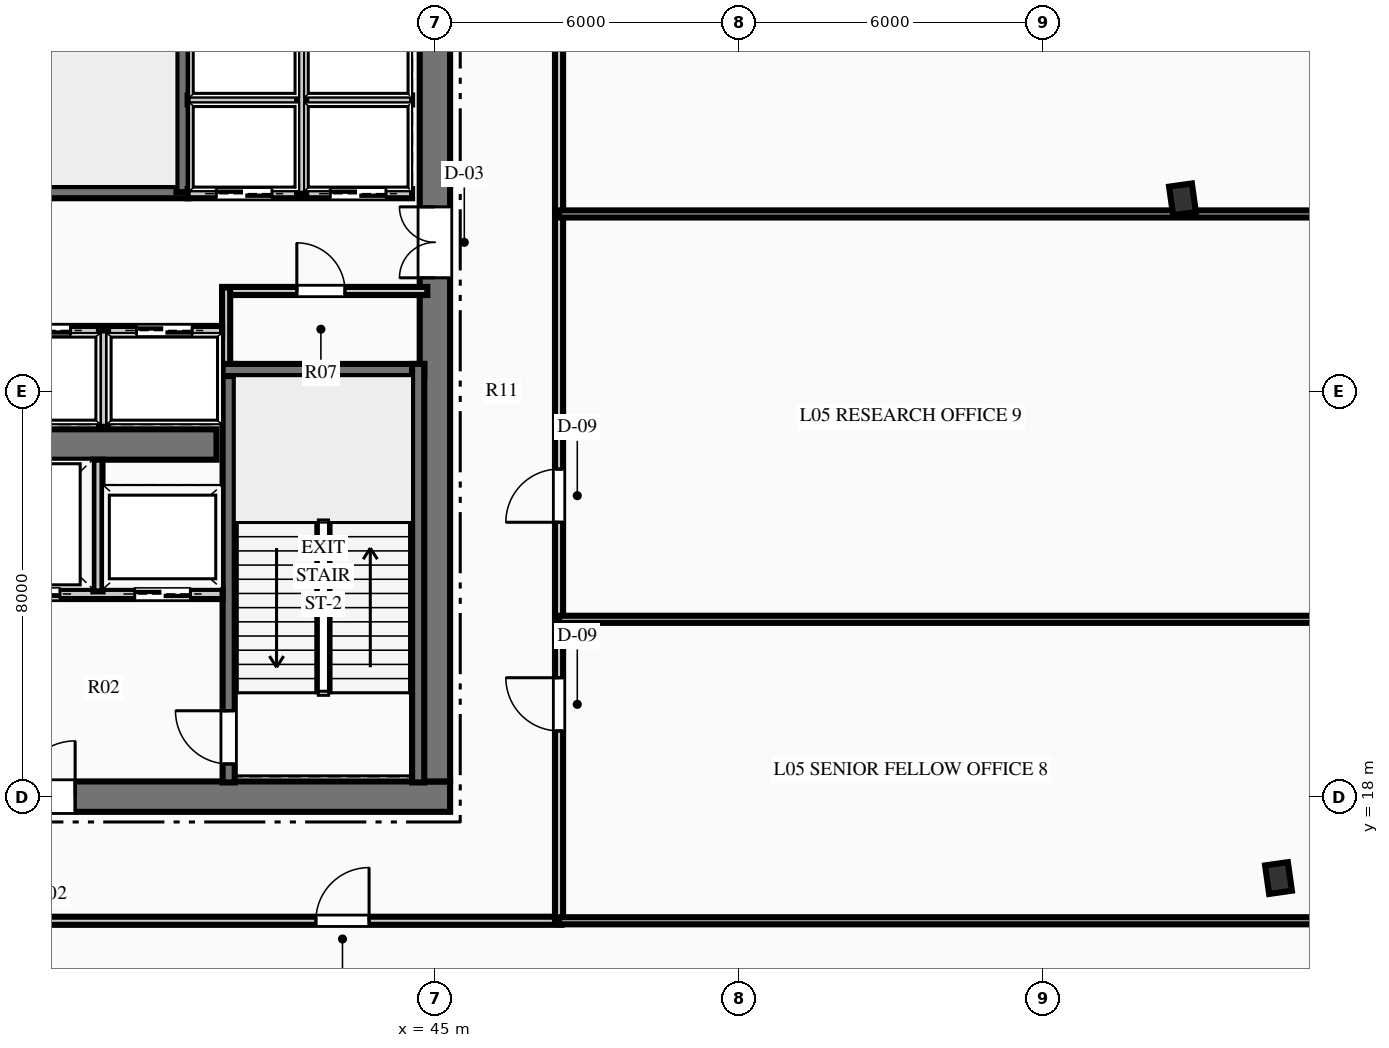
"""IFC4 building model, lengths in metres.
Left out: names, types, materials, properties, quantities, classifications, styles, units other than length and angle.
Written with IfcOpenShell. Run it as: python <this file> out.ifc"""

import sys

from ifc_helpers import new_model, si_unit, direction, frame, frame_2d, origin, origin_2d, place, context, subcontext, project, spatial, rectangle, i_section, extrude, element, fill, save


model = new_model("IFC4")
c1 = context("Model", 3, precision=1e-05, world=origin(), true_north=direction((0.0, 1.0)))
c2 = subcontext(c1, "Body", "Model", "MODEL_VIEW")
j1 = project(units=[si_unit("LENGTHUNIT", "METRE"), si_unit("PLANEANGLEUNIT", "RADIAN")], contexts=[c1])
p1 = place(None, origin())
s1 = spatial("IfcSite", under=j1, at=p1, CompositionType="ELEMENT")
p2 = place(p1, origin())
s2 = spatial("IfcBuilding", under=s1, at=p2, CompositionType="ELEMENT")
p3 = place(p2, frame((0.0, 0.0, 28.2)))
s3 = spatial("IfcBuildingStorey", under=s2, at=p3, CompositionType="ELEMENT", Elevation=28.2)
p4 = place(p3, frame((26.7, 18.0, 0.0), z_axis=(0.0, 0.0, 1.0), x_axis=(1.0, 0.0, 0.0)))
e1 = element("IfcWall", 1, at=p4, inside=s3, PredefinedType="SHEAR", context=c2, shape_type="SweptSolid", body=[
    extrude(rectangle(XDim=18.6, YDim=0.6, at=frame_2d((9.3, 0.0))), origin(), (0.0, 0.0, 1.0), 4.5),
])
p5 = place(p4, frame((7.4, 0.0, 0.0)))
e2 = element("IfcOpeningElement", 2, at=p5, cuts=e1, PredefinedType="OPENING", context=c2, shape_type="SweptSolid", body=[
    extrude(rectangle(XDim=1.1, YDim=2.15, at=frame_2d((0.55, 1.075))), frame((0.0, 0.31, 0.0), z_axis=(0.0, -1.0, 0.0), x_axis=(1.0, 0.0, 0.0)), (0.0, 0.0, 1.0), 0.62),
])
p6 = place(p4, frame((10.1, 0.0, 0.0)))
e3 = element("IfcOpeningElement", 3, at=p6, cuts=e1, PredefinedType="OPENING", context=c2, shape_type="SweptSolid", body=[
    extrude(rectangle(XDim=1.1, YDim=2.15, at=frame_2d((0.55, 1.075))), frame((0.0, 0.31, 0.0), z_axis=(0.0, -1.0, 0.0), x_axis=(1.0, 0.0, 0.0)), (0.0, 0.0, 1.0), 0.62),
])
p7 = place(p3, frame((45.0, 18.3, 0.0), z_axis=(0.0, 0.0, 1.0), x_axis=(0.0, 1.0, 0.0)))
e4 = element("IfcWall", 4, at=p7, inside=s3, PredefinedType="SHEAR", context=c2, shape_type="SweptSolid", body=[
    extrude(rectangle(XDim=15.4, YDim=0.6, at=frame_2d((7.7, 0.0))), origin(), (0.0, 0.0, 1.0), 4.5),
])
p8 = place(p7, frame((9.94, 0.0, 0.0)))
e5 = element("IfcOpeningElement", 5, at=p8, cuts=e4, PredefinedType="OPENING", context=c2, shape_type="SweptSolid", body=[
    extrude(rectangle(XDim=1.4, YDim=2.2, at=frame_2d((0.7, 1.1))), frame((0.0, 0.31, 0.0), z_axis=(0.0, -1.0, 0.0), x_axis=(1.0, 0.0, 0.0)), (0.0, 0.0, 1.0), 0.62),
])
p9 = place(p3, frame((31.31, 24.95, 0.0), z_axis=(0.0, 0.0, 1.0), x_axis=(1.0, 0.0, 0.0)))
e6 = element("IfcWall", 6, at=p9, inside=s3, PredefinedType="SHEAR", context=c2, shape_type="SweptSolid", body=[
    extrude(rectangle(XDim=9.38, YDim=0.6, at=frame_2d((4.69, 0.0))), origin(), (0.0, 0.0, 1.0), 4.5),
])
p10 = place(p3, frame((40.93, 18.28, 0.0), z_axis=(0.0, 0.0, 1.0), x_axis=(0.0, 1.0, 0.0)))
e7 = element("IfcWall", 7, at=p10, inside=s3, PredefinedType="SHEAR", context=c2, shape_type="SweptSolid", body=[
    extrude(rectangle(XDim=8.26, YDim=0.24, at=frame_2d((4.13, 0.0))), origin(), (0.0, 0.0, 1.0), 4.5),
])
p11 = place(p10, frame((0.365, 0.0, 0.0)))
e8 = element("IfcOpeningElement", 8, at=p11, cuts=e7, PredefinedType="OPENING", context=c2, shape_type="SweptSolid", body=[
    extrude(rectangle(XDim=1.05, YDim=2.15, at=frame_2d((0.525, 1.075))), frame((0.0, 0.13, 0.0), z_axis=(0.0, -1.0, 0.0), x_axis=(1.0, 0.0, 0.0)), (0.0, 0.0, 1.0), 0.26),
])
p12 = place(p3, frame((40.81, 26.42, 0.0), z_axis=(0.0, 0.0, 1.0), x_axis=(1.0, 0.0, 0.0)))
e9 = element("IfcWall", 9, at=p12, inside=s3, PredefinedType="SHEAR", context=c2, shape_type="SweptSolid", body=[
    extrude(rectangle(XDim=3.98, YDim=0.24, at=frame_2d((1.99, 0.0))), origin(), (0.0, 0.0, 1.0), 4.5),
])
p13 = place(p3, frame((44.67, 18.28, 0.0), z_axis=(0.0, 0.0, 1.0), x_axis=(0.0, 1.0, 0.0)))
e10 = element("IfcWall", 10, at=p13, inside=s3, PredefinedType="SHEAR", context=c2, shape_type="SweptSolid", body=[
    extrude(rectangle(XDim=8.26, YDim=0.24, at=frame_2d((4.13, 0.0))), origin(), (0.0, 0.0, 1.0), 4.5),
])
p14 = place(p3, frame((31.76, 29.93, 0.0), z_axis=(0.0, 0.0, 1.0), x_axis=(1.0, 0.0, 0.0)))
e11 = element("IfcWall", 11, at=p14, inside=s3, PredefinedType="SHEAR", context=c2, shape_type="SweptSolid", body=[
    extrude(rectangle(XDim=8.38, YDim=0.24, at=frame_2d((4.19, 0.0))), origin(), (0.0, 0.0, 1.0), 4.5),
])
p15 = place(p14, frame((0.565, 0.0, 0.0)))
e12 = element("IfcOpeningElement", 12, at=p15, cuts=e11, PredefinedType="OPENING", context=c2, shape_type="SweptSolid", body=[
    extrude(rectangle(XDim=1.05, YDim=2.15, at=frame_2d((0.525, 1.075))), frame((0.0, 0.13, 0.0), z_axis=(0.0, -1.0, 0.0), x_axis=(1.0, 0.0, 0.0)), (0.0, 0.0, 1.0), 0.26),
])
p16 = place(p3, frame((40.02, 29.93, 0.0), z_axis=(0.0, 0.0, 1.0), x_axis=(0.0, 1.0, 0.0)))
e13 = element("IfcWall", 13, at=p16, inside=s3, PredefinedType="SHEAR", context=c2, shape_type="SweptSolid", body=[
    extrude(rectangle(XDim=3.85, YDim=0.24, at=frame_2d((1.925, 0.0))), origin(), (0.0, 0.0, 1.0), 4.5),
])
for number, where, z_axis, x_axis in (
    (14, (61.648, 16.393, 0.0), (0.0, 0.0, 1.0), (0.99, 0.14, 0.0)),
    (15, (59.753, 29.789, 0.0), (0.0, 0.0, 1.0), (0.99, 0.14, 0.0)),
):
    element("IfcColumn", number, at=place(p3, frame(where, z_axis=z_axis, x_axis=x_axis)), inside=s3, PredefinedType="COLUMN", context=c2, shape_type="SweptSolid", body=[
        extrude(i_section(OverallWidth=0.454, OverallDepth=0.569, WebThickness=0.078, FlangeThickness=0.125, at=origin_2d()), origin(), (0.0, 0.0, 1.0), 4.5),
    ])
p17 = place(p3, frame((36.12, 22.0, 0.0), z_axis=(0.0, 0.0, 1.0), x_axis=(1.0, 0.0, 0.0)))
e16 = element("IfcWall", 16, at=p17, inside=s3, PredefinedType="PARTITIONING", context=c2, shape_type="SweptSolid", body=[
    extrude(rectangle(XDim=4.69, YDim=0.2, at=frame_2d((2.345, 0.0))), origin(), (0.0, 0.0, 1.0), 4.19),
])
p18 = place(p17, frame((2.955, 0.0, 0.0)))
e17 = element("IfcOpeningElement", 17, at=p18, cuts=e16, PredefinedType="OPENING", context=c2, shape_type="SweptSolid", body=[
    extrude(rectangle(XDim=1.1, YDim=2.15, at=frame_2d((0.55, 1.075))), frame((0.0, 0.11, 0.0), z_axis=(0.0, -1.0, 0.0), x_axis=(1.0, 0.0, 0.0)), (0.0, 0.0, 1.0), 0.22),
])
p19 = place(p17, frame((0.08, 0.0, 0.0)))
e18 = element("IfcOpeningElement", 18, at=p19, cuts=e16, PredefinedType="OPENING", context=c2, shape_type="SweptSolid", body=[
    extrude(rectangle(XDim=1.4, YDim=2.2, at=frame_2d((0.7, 1.1))), frame((0.0, 0.11, 0.0), z_axis=(0.0, -1.0, 0.0), x_axis=(1.0, 0.0, 0.0)), (0.0, 0.0, 1.0), 0.22),
])
p20 = place(p3, frame((38.35, 22.05, 0.0), z_axis=(0.0, 0.0, 1.0), x_axis=(0.0, 1.0, 0.0)))
e19 = element("IfcWall", 19, at=p20, inside=s3, PredefinedType="PARTITIONING", context=c2, shape_type="SweptSolid", body=[
    extrude(rectangle(XDim=2.6, YDim=0.18, at=frame_2d((1.3, 0.0))), origin(), (0.0, 0.0, 1.0), 4.19),
])
p21 = place(p3, frame((40.8, 27.98, 0.0), z_axis=(0.0, 0.0, 1.0), x_axis=(1.0, 0.0, 0.0)))
e20 = element("IfcWall", 20, at=p21, inside=s3, PredefinedType="PARTITIONING", context=c2, shape_type="SweptSolid", body=[
    extrude(rectangle(XDim=4.05, YDim=0.16, at=frame_2d((2.025, 0.0))), origin(), (0.0, 0.0, 1.0), 4.19),
])
p22 = place(p21, frame((1.475, 0.0, 0.0)))
e21 = element("IfcOpeningElement", 21, at=p22, cuts=e20, PredefinedType="OPENING", context=c2, shape_type="SweptSolid", body=[
    extrude(rectangle(XDim=0.95, YDim=2.15, at=frame_2d((0.475, 1.075))), frame((0.0, 0.09, 0.0), z_axis=(0.0, -1.0, 0.0), x_axis=(1.0, 0.0, 0.0)), (0.0, 0.0, 1.0), 0.18),
])
p23 = place(p3, frame((40.88, 26.54, 0.0), z_axis=(0.0, 0.0, 1.0), x_axis=(0.0, 1.0, 0.0)))
e22 = element("IfcWall", 22, at=p23, inside=s3, PredefinedType="PARTITIONING", context=c2, shape_type="SweptSolid", body=[
    extrude(rectangle(XDim=1.51, YDim=0.16, at=frame_2d((0.755, 0.0))), origin(), (0.0, 0.0, 1.0), 4.19),
])
p24 = place(p3, frame((40.12, 29.9, 0.0), z_axis=(0.0, 0.0, 1.0), x_axis=(1.0, 0.0, 0.0)))
e23 = element("IfcWall", 23, at=p24, inside=s3, PredefinedType="PARTITIONING", context=c2, shape_type="SweptSolid", body=[
    extrude(rectangle(XDim=4.43, YDim=0.18, at=frame_2d((2.215, 0.0))), origin(), (0.0, 0.0, 1.0), 4.19),
])
p25 = place(p24, frame((0.565, 0.0, 0.0)))
e24 = element("IfcOpeningElement", 24, at=p25, cuts=e23, PredefinedType="OPENING", context=c2, shape_type="SweptSolid", body=[
    extrude(rectangle(XDim=1.1, YDim=2.15, at=frame_2d((0.55, 1.075))), frame((0.0, 0.1, 0.0), z_axis=(0.0, -1.0, 0.0), x_axis=(1.0, 0.0, 0.0)), (0.0, 0.0, 1.0), 0.2),
])
p26 = place(p24, frame((2.815, 0.0, 0.0)))
e25 = element("IfcOpeningElement", 25, at=p26, cuts=e23, PredefinedType="OPENING", context=c2, shape_type="SweptSolid", body=[
    extrude(rectangle(XDim=1.1, YDim=2.15, at=frame_2d((0.55, 1.075))), frame((0.0, 0.1, 0.0), z_axis=(0.0, -1.0, 0.0), x_axis=(1.0, 0.0, 0.0)), (0.0, 0.0, 1.0), 0.2),
])
p27 = place(p3, frame((40.12, 31.75, 0.0), z_axis=(0.0, 0.0, 1.0), x_axis=(1.0, 0.0, 0.0)))
e26 = element("IfcWall", 26, at=p27, inside=s3, PredefinedType="PARTITIONING", context=c2, shape_type="SweptSolid", body=[
    extrude(rectangle(XDim=4.43, YDim=0.18, at=frame_2d((2.215, 0.0))), origin(), (0.0, 0.0, 1.0), 4.19),
])
p28 = place(p3, frame((42.37, 29.9, 0.0), z_axis=(0.0, 0.0, 1.0), x_axis=(0.0, 1.0, 0.0)))
e27 = element("IfcWall", 27, at=p28, inside=s3, PredefinedType="PARTITIONING", context=c2, shape_type="SweptSolid", body=[
    extrude(rectangle(XDim=3.75, YDim=0.18, at=frame_2d((1.875, 0.0))), origin(), (0.0, 0.0, 1.0), 4.19),
])
p29 = place(p3, frame((31.2, 27.2, 0.0), z_axis=(0.0, 0.0, 1.0), x_axis=(1.0, 0.0, 0.0)))
e28 = element("IfcWall", 28, at=p29, inside=s3, PredefinedType="PARTITIONING", context=c2, shape_type="SweptSolid", body=[
    extrude(rectangle(XDim=9.6, YDim=0.18, at=frame_2d((4.8, 0.0))), origin(), (0.0, 0.0, 1.0), 4.19),
])
p30 = place(p29, frame((0.59, 0.0, 0.0)))
e29 = element("IfcOpeningElement", 29, at=p30, cuts=e28, PredefinedType="OPENING", context=c2, shape_type="SweptSolid", body=[
    extrude(rectangle(XDim=1.1, YDim=2.15, at=frame_2d((0.55, 1.075))), frame((0.0, 0.1, 0.0), z_axis=(0.0, -1.0, 0.0), x_axis=(1.0, 0.0, 0.0)), (0.0, 0.0, 1.0), 0.2),
])
p31 = place(p29, frame((2.99, 0.0, 0.0)))
e30 = element("IfcOpeningElement", 30, at=p31, cuts=e28, PredefinedType="OPENING", context=c2, shape_type="SweptSolid", body=[
    extrude(rectangle(XDim=1.1, YDim=2.15, at=frame_2d((0.55, 1.075))), frame((0.0, 0.1, 0.0), z_axis=(0.0, -1.0, 0.0), x_axis=(1.0, 0.0, 0.0)), (0.0, 0.0, 1.0), 0.2),
])
p32 = place(p29, frame((5.51, 0.0, 0.0)))
e31 = element("IfcOpeningElement", 31, at=p32, cuts=e28, PredefinedType="OPENING", context=c2, shape_type="SweptSolid", body=[
    extrude(rectangle(XDim=1.1, YDim=2.15, at=frame_2d((0.55, 1.075))), frame((0.0, 0.1, 0.0), z_axis=(0.0, -1.0, 0.0), x_axis=(1.0, 0.0, 0.0)), (0.0, 0.0, 1.0), 0.2),
])
p33 = place(p29, frame((7.91, 0.0, 0.0)))
e32 = element("IfcOpeningElement", 32, at=p33, cuts=e28, PredefinedType="OPENING", context=c2, shape_type="SweptSolid", body=[
    extrude(rectangle(XDim=1.1, YDim=2.15, at=frame_2d((0.55, 1.075))), frame((0.0, 0.1, 0.0), z_axis=(0.0, -1.0, 0.0), x_axis=(1.0, 0.0, 0.0)), (0.0, 0.0, 1.0), 0.2),
])
p34 = place(p3, frame((38.46, 25.3, 0.0), z_axis=(0.0, 0.0, 1.0), x_axis=(0.0, 1.0, 0.0)))
e33 = element("IfcWall", 33, at=p34, inside=s3, PredefinedType="PARTITIONING", context=c2, shape_type="SweptSolid", body=[
    extrude(rectangle(XDim=1.9, YDim=0.18, at=frame_2d((0.95, 0.0))), origin(), (0.0, 0.0, 1.0), 4.19),
])
p35 = place(p3, frame((24.5, 15.55, 0.0), z_axis=(0.0, 0.0, 1.0), x_axis=(1.0, 0.0, 0.0)))
e34 = element("IfcWall", 34, at=p35, inside=s3, PredefinedType="PARTITIONING", context=c2, shape_type="SweptSolid", body=[
    extrude(rectangle(XDim=23.0, YDim=0.16, at=frame_2d((11.5, 0.0))), origin(), (0.0, 0.0, 1.0), 4.19),
])
p36 = place(p35, frame((3.525, 0.0, 0.0)))
e35 = element("IfcOpeningElement", 35, at=p36, cuts=e34, PredefinedType="OPENING", context=c2, shape_type="SweptSolid", body=[
    extrude(rectangle(XDim=0.95, YDim=2.15, at=frame_2d((0.475, 1.075))), frame((0.0, 0.09, 0.0), z_axis=(0.0, -1.0, 0.0), x_axis=(1.0, 0.0, 0.0)), (0.0, 0.0, 1.0), 0.18),
])
p37 = place(p35, frame((18.151, 0.0, 0.0)))
e36 = element("IfcOpeningElement", 36, at=p37, cuts=e34, PredefinedType="OPENING", context=c2, shape_type="SweptSolid", body=[
    extrude(rectangle(XDim=1.05, YDim=2.15, at=frame_2d((0.525, 1.075))), frame((0.0, 0.09, 0.0), z_axis=(0.0, -1.0, 0.0), x_axis=(1.0, 0.0, 0.0)), (0.0, 0.0, 1.0), 0.18),
])
p38 = place(p3, frame((47.45, 15.55, 0.0), z_axis=(0.0, 0.0, 1.0), x_axis=(0.0, 1.0, 0.0)))
e37 = element("IfcWall", 37, at=p38, inside=s3, PredefinedType="PARTITIONING", context=c2, shape_type="SweptSolid", body=[
    extrude(rectangle(XDim=20.9, YDim=0.16, at=frame_2d((10.45, 0.0))), origin(), (0.0, 0.0, 1.0), 4.19),
])
p39 = place(p38, frame((3.747, 0.0, 0.0)))
e38 = element("IfcOpeningElement", 38, at=p39, cuts=e37, PredefinedType="OPENING", context=c2, shape_type="SweptSolid", body=[
    extrude(rectangle(XDim=1.05, YDim=2.15, at=frame_2d((0.525, 1.075))), frame((0.0, 0.09, 0.0), z_axis=(0.0, -1.0, 0.0), x_axis=(1.0, 0.0, 0.0)), (0.0, 0.0, 1.0), 0.18),
])
p40 = place(p38, frame((7.865, 0.0, 0.0)))
e39 = element("IfcOpeningElement", 39, at=p40, cuts=e37, PredefinedType="OPENING", context=c2, shape_type="SweptSolid", body=[
    extrude(rectangle(XDim=1.05, YDim=2.15, at=frame_2d((0.525, 1.075))), frame((0.0, 0.09, 0.0), z_axis=(0.0, -1.0, 0.0), x_axis=(1.0, 0.0, 0.0)), (0.0, 0.0, 1.0), 0.18),
])
p41 = place(p38, frame((18.045, 0.0, 0.0)))
e40 = element("IfcOpeningElement", 40, at=p41, cuts=e37, PredefinedType="OPENING", context=c2, shape_type="SweptSolid", body=[
    extrude(rectangle(XDim=1.05, YDim=2.15, at=frame_2d((0.525, 1.075))), frame((0.0, 0.09, 0.0), z_axis=(0.0, -1.0, 0.0), x_axis=(1.0, 0.0, 0.0)), (0.0, 0.0, 1.0), 0.18),
])
for number, where, z_axis, x_axis in (
    (41, (47.45, 15.55, 0.0), (0.0, 0.0, 1.0), (1.0, 0.0, 0.0)),
    (42, (47.45, 21.5, 0.0), (0.0, 0.0, 1.0), (1.0, 0.0, 0.0)),
):
    element("IfcWall", number, at=place(p3, frame(where, z_axis=z_axis, x_axis=x_axis)), inside=s3, PredefinedType="PARTITIONING", context=c2, shape_type="SweptSolid", body=[
        extrude(rectangle(XDim=15.51, YDim=0.14, at=frame_2d((7.755, 0.0))), origin(), (0.0, 0.0, 1.0), 4.19),
    ])
p42 = place(p3, frame((47.45, 29.5, 0.0), z_axis=(0.0, 0.0, 1.0), x_axis=(1.0, 0.0, 0.0)))
e43 = element("IfcWall", 43, at=p42, inside=s3, PredefinedType="PARTITIONING", context=c2, shape_type="SweptSolid", body=[
    extrude(rectangle(XDim=15.51, YDim=0.14, at=frame_2d((7.755, 0.0))), origin(), (0.0, 0.0, 1.0), 3.489),
])
p43 = place(p22, origin())
e44 = element("IfcDoor", 44, at=p43, inside=s3, OperationType="SINGLE_SWING_LEFT", PredefinedType="DOOR", context=c2, shape_type="SweptSolid", body=[
    extrude(rectangle(XDim=0.95, YDim=2.15, at=frame_2d((0.475, 1.075))), frame((0.0, 0.025, 0.0), z_axis=(0.0, -1.0, 0.0), x_axis=(1.0, 0.0, 0.0)), (0.0, 0.0, 1.0), 0.05),
])
fill(e21, e44)
p44 = place(p11, origin())
e45 = element("IfcDoor", 45, at=p44, inside=s3, OperationType="SINGLE_SWING_RIGHT", PredefinedType="DOOR", context=c2, shape_type="SweptSolid", body=[
    extrude(rectangle(XDim=1.05, YDim=2.15, at=frame_2d((0.525, 1.075))), frame((0.0, 0.025, 0.0), z_axis=(0.0, -1.0, 0.0), x_axis=(1.0, 0.0, 0.0)), (0.0, 0.0, 1.0), 0.05),
])
fill(e8, e45)
p45 = place(p6, origin())
e46 = element("IfcDoor", 46, at=p45, inside=s3, OperationType="SINGLE_SWING_RIGHT", PredefinedType="DOOR", context=c2, shape_type="SweptSolid", body=[
    extrude(rectangle(XDim=1.1, YDim=2.15, at=frame_2d((0.55, 1.075))), frame((0.0, 0.025, 0.0), z_axis=(0.0, -1.0, 0.0), x_axis=(1.0, 0.0, 0.0)), (0.0, 0.0, 1.0), 0.05),
])
fill(e3, e46)
p46 = place(p8, origin())
e47 = element("IfcDoor", 47, at=p46, inside=s3, OperationType="DOUBLE_DOOR_SINGLE_SWING", PredefinedType="DOOR", context=c2, shape_type="SweptSolid", body=[
    extrude(rectangle(XDim=1.4, YDim=2.2, at=frame_2d((0.7, 1.1))), frame((0.0, 0.025, 0.0), z_axis=(0.0, -1.0, 0.0), x_axis=(1.0, 0.0, 0.0)), (0.0, 0.0, 1.0), 0.05),
])
fill(e5, e47)
p47 = place(p37, origin())
e48 = element("IfcDoor", 48, at=p47, inside=s3, OperationType="SINGLE_SWING_RIGHT", PredefinedType="DOOR", context=c2, shape_type="SweptSolid", body=[
    extrude(rectangle(XDim=1.05, YDim=2.15, at=frame_2d((0.525, 1.075))), frame((0.0, 0.025, 0.0), z_axis=(0.0, -1.0, 0.0), x_axis=(1.0, 0.0, 0.0)), (0.0, 0.0, 1.0), 0.05),
])
fill(e36, e48)
p48 = place(p39, origin())
e49 = element("IfcDoor", 49, at=p48, inside=s3, OperationType="SINGLE_SWING_RIGHT", PredefinedType="DOOR", context=c2, shape_type="SweptSolid", body=[
    extrude(rectangle(XDim=1.05, YDim=2.15, at=frame_2d((0.525, 1.075))), frame((0.0, 0.025, 0.0), z_axis=(0.0, -1.0, 0.0), x_axis=(1.0, 0.0, 0.0)), (0.0, 0.0, 1.0), 0.05),
])
fill(e38, e49)
p49 = place(p40, origin())
e50 = element("IfcDoor", 50, at=p49, inside=s3, OperationType="SINGLE_SWING_LEFT", PredefinedType="DOOR", context=c2, shape_type="SweptSolid", body=[
    extrude(rectangle(XDim=1.05, YDim=2.15, at=frame_2d((0.525, 1.075))), frame((0.0, 0.025, 0.0), z_axis=(0.0, -1.0, 0.0), x_axis=(1.0, 0.0, 0.0)), (0.0, 0.0, 1.0), 0.05),
])
fill(e39, e50)
p50 = place(p25, origin())
e51 = element("IfcDoor", 51, at=p50, inside=s3, OperationType="SLIDING_TO_LEFT", PredefinedType="DOOR", context=c2, shape_type="SweptSolid", body=[
    extrude(rectangle(XDim=1.1, YDim=2.15, at=frame_2d((0.55, 1.075))), frame((0.0, 0.025, 0.0), z_axis=(0.0, -1.0, 0.0), x_axis=(1.0, 0.0, 0.0)), (0.0, 0.0, 1.0), 0.05),
])
fill(e24, e51)
p51 = place(p26, origin())
e52 = element("IfcDoor", 52, at=p51, inside=s3, OperationType="SLIDING_TO_LEFT", PredefinedType="DOOR", context=c2, shape_type="SweptSolid", body=[
    extrude(rectangle(XDim=1.1, YDim=2.15, at=frame_2d((0.55, 1.075))), frame((0.0, 0.025, 0.0), z_axis=(0.0, -1.0, 0.0), x_axis=(1.0, 0.0, 0.0)), (0.0, 0.0, 1.0), 0.05),
])
fill(e25, e52)
p52 = place(p32, origin())
e53 = element("IfcDoor", 53, at=p52, inside=s3, OperationType="SLIDING_TO_LEFT", PredefinedType="DOOR", context=c2, shape_type="SweptSolid", body=[
    extrude(rectangle(XDim=1.1, YDim=2.15, at=frame_2d((0.55, 1.075))), frame((0.0, 0.025, 0.0), z_axis=(0.0, -1.0, 0.0), x_axis=(1.0, 0.0, 0.0)), (0.0, 0.0, 1.0), 0.05),
])
fill(e31, e53)
p53 = place(p33, origin())
e54 = element("IfcDoor", 54, at=p53, inside=s3, OperationType="SLIDING_TO_LEFT", PredefinedType="DOOR", context=c2, shape_type="SweptSolid", body=[
    extrude(rectangle(XDim=1.1, YDim=2.15, at=frame_2d((0.55, 1.075))), frame((0.0, 0.025, 0.0), z_axis=(0.0, -1.0, 0.0), x_axis=(1.0, 0.0, 0.0)), (0.0, 0.0, 1.0), 0.05),
])
fill(e32, e54)
p54 = place(p18, origin())
e55 = element("IfcDoor", 55, at=p54, inside=s3, OperationType="SLIDING_TO_LEFT", PredefinedType="DOOR", context=c2, shape_type="SweptSolid", body=[
    extrude(rectangle(XDim=1.1, YDim=2.15, at=frame_2d((0.55, 1.075))), frame((0.0, 0.025, 0.0), z_axis=(0.0, -1.0, 0.0), x_axis=(1.0, 0.0, 0.0)), (0.0, 0.0, 1.0), 0.05),
])
fill(e17, e55)
p55 = place(p19, origin())
e56 = element("IfcDoor", 56, at=p55, inside=s3, OperationType="SLIDING_TO_LEFT", PredefinedType="DOOR", context=c2, shape_type="SweptSolid", body=[
    extrude(rectangle(XDim=1.4, YDim=2.2, at=frame_2d((0.7, 1.1))), frame((0.0, 0.025, 0.0), z_axis=(0.0, -1.0, 0.0), x_axis=(1.0, 0.0, 0.0)), (0.0, 0.0, 1.0), 0.05),
])
fill(e18, e56)
save(model, sys.argv[1])
